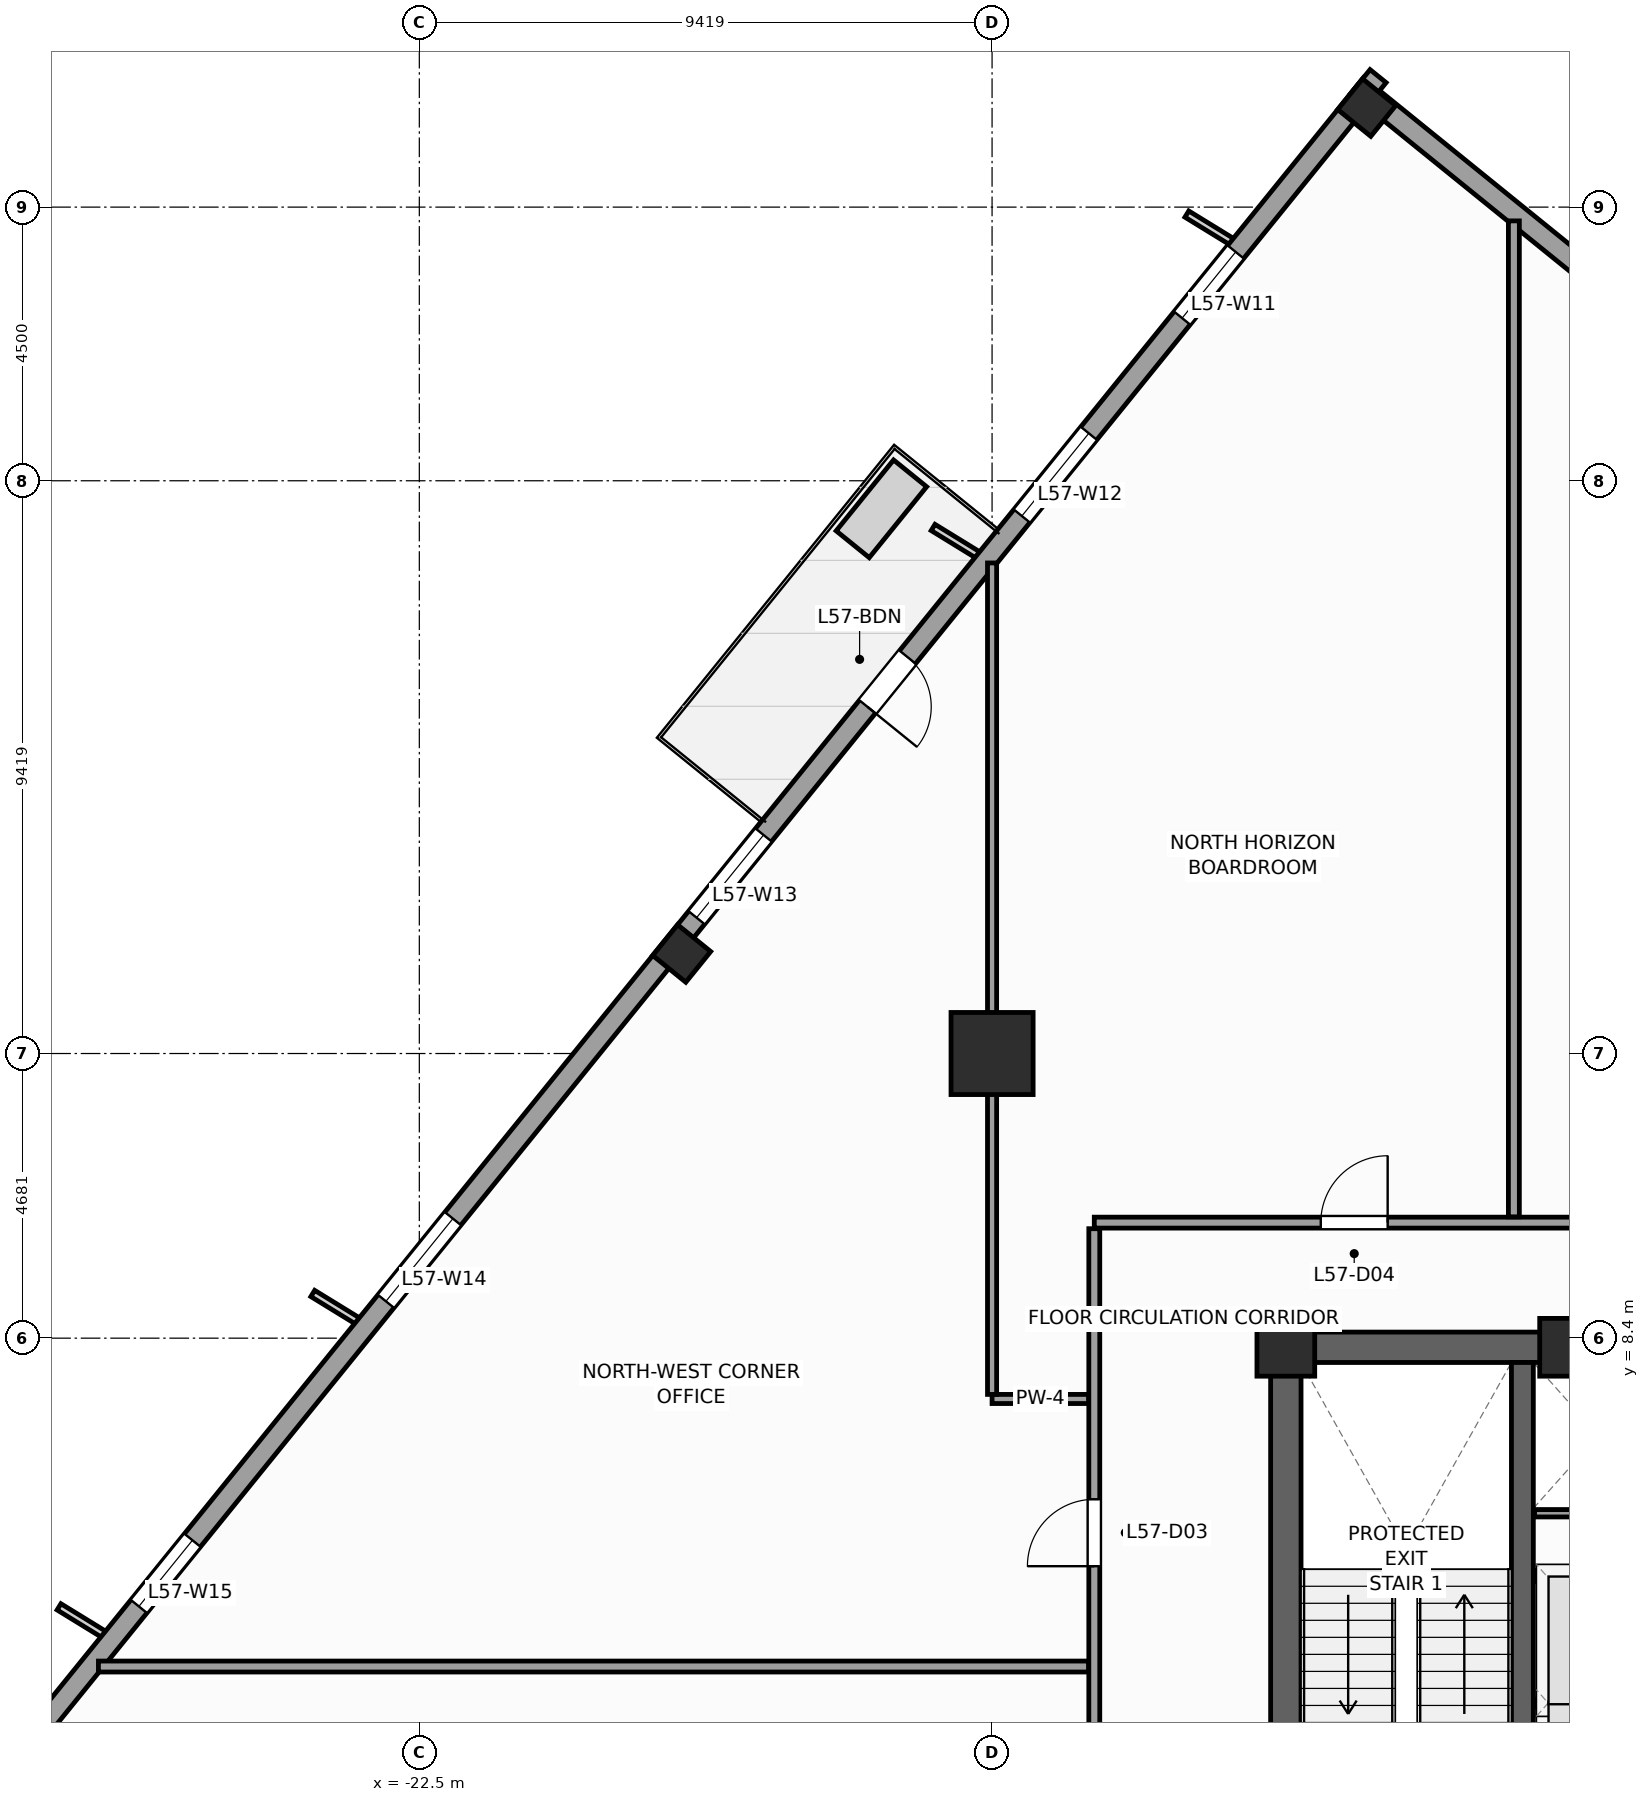
"""IFC4 building model, lengths in metres.
Left out: names, types, materials, properties, quantities, classifications, styles, units other than length and angle.
Written with IfcOpenShell. Run it as: python <this file> out.ifc"""

import sys

from ifc_helpers import new_model, si_unit, direction, frame, frame_2d, origin, origin_2d, place, context, subcontext, project, spatial, rectangle, extrude, source, transform, mapped, element, fill, save


model = new_model("IFC4")
c1 = context("Model", 3, precision=1e-05, world=origin(), true_north=direction((0.0, 1.0)))
c2 = subcontext(c1, "Body", "Model", "MODEL_VIEW")
j1 = project(units=[si_unit("LENGTHUNIT", "METRE"), si_unit("PLANEANGLEUNIT", "RADIAN")], contexts=[c1])
p1 = place(None, origin())
s1 = spatial("IfcSite", under=j1, at=p1, CompositionType="ELEMENT")
p2 = place(p1, origin())
s2 = spatial("IfcBuilding", under=s1, at=p2, CompositionType="ELEMENT")
p3 = place(p2, frame((0.0, 0.0, 236.8)))
s3 = spatial("IfcBuildingStorey", under=s2, at=p3, CompositionType="ELEMENT", Elevation=236.8)
p4 = place(p3, frame((-8.5, 8.25, 0.0), z_axis=(0.0, 0.0, 1.0), x_axis=(1.0, 0.0, 0.0)))
e1 = element("IfcWall", 1, at=p4, inside=s3, PredefinedType="SHEAR", context=c2, shape_type="SweptSolid", body=[
    extrude(rectangle(XDim=17.0, YDim=0.5, at=frame_2d((8.5, 0.0))), origin(), (0.0, 0.0, 1.0), 3.9),
])
p5 = place(p3, frame((-8.25, -8.0, 0.0), z_axis=(0.0, 0.0, 1.0), x_axis=(0.0, 1.0, 0.0)))
e2 = element("IfcWall", 2, at=p5, inside=s3, PredefinedType="SHEAR", context=c2, shape_type="SweptSolid", body=[
    extrude(rectangle(XDim=16.0, YDim=0.5, at=frame_2d((8.0, 0.0))), origin(), (0.0, 0.0, 1.0), 3.9),
])
p6 = place(p5, frame((4.69, 0.0, 0.0)))
e3 = element("IfcOpeningElement", 3, at=p6, cuts=e2, PredefinedType="OPENING", context=c2, shape_type="SweptSolid", body=[
    extrude(rectangle(XDim=1.3, YDim=2.2, at=frame_2d((0.65, 1.1))), frame((0.0, 0.26, 0.0), z_axis=(0.0, -1.0, 0.0), x_axis=(1.0, 0.0, 0.0)), (0.0, 0.0, 1.0), 0.52),
])
p7 = place(p3, frame((-4.36, -8.0, 0.0), z_axis=(0.0, 0.0, 1.0), x_axis=(0.0, 1.0, 0.0)))
e4 = element("IfcWall", 4, at=p7, inside=s3, PredefinedType="SHEAR", context=c2, shape_type="SweptSolid", body=[
    extrude(rectangle(XDim=16.0, YDim=0.36, at=frame_2d((8.0, 0.0))), origin(), (0.0, 0.0, 1.0), 3.9),
])
m1 = source(origin(), c2, "Body", "SweptSolid", [
    extrude(rectangle(XDim=0.95, YDim=0.95, at=origin_2d()), origin(), (0.0, 0.0, 1.0), 3.9),
])
for number, where, z_axis, x_axis in (
    (5, (-8.25, 8.25, 0.0), (0.0, 0.0, 1.0), (1.0, 0.0, 0.0)),
    (6, (-3.6, 8.25, 0.0), (0.0, 0.0, 1.0), (1.0, 0.0, 0.0)),
):
    element("IfcColumn", number, at=place(p3, frame(where, z_axis=z_axis, x_axis=x_axis)), inside=s3, PredefinedType="PILASTER", context=c2, shape_type="MappedRepresentation", body=[
        mapped(m1, transform((0.0, 0.0, 0.0), scale=1.0)),
    ])
m2 = source(origin(), c2, "Body", "SweptSolid", [
    extrude(rectangle(XDim=1.35, YDim=1.35, at=origin_2d()), origin(), (0.0, 0.0, 1.0), 3.9),
])
p8 = place(p3, frame((-13.081, 13.081, 0.0), z_axis=(0.0, 0.0, 1.0), x_axis=(1.0, 0.0, 0.0)))
e7 = element("IfcColumn", 7, at=p8, inside=s3, PredefinedType="COLUMN", context=c2, shape_type="MappedRepresentation", body=[
    mapped(m2, transform((0.0, 0.0, 0.0), scale=1.0)),
])
m3 = source(origin(), c2, "Body", "SweptSolid", [
    extrude(rectangle(XDim=0.65, YDim=0.7, at=origin_2d()), origin(), (0.0, 0.0, 1.0), 3.9),
])
for number, where, z_axis, x_axis in (
    (8, (-6.92, 28.637, 0.0), (0.0, 0.0, 1.0), (0.629, 0.777, 0.0)),
    (9, (-18.185, 14.726, 0.0), (0.0, 0.0, 1.0), (0.629, 0.777, 0.0)),
):
    element("IfcColumn", number, at=place(p3, frame(where, z_axis=z_axis, x_axis=x_axis)), inside=s3, PredefinedType="COLUMN", context=c2, shape_type="MappedRepresentation", body=[
        mapped(m3, transform((0.0, 0.0, 0.0), scale=1.0)),
    ])
p9 = place(p3, frame((-2.673, 25.429, 0.0), z_axis=(0.0, 0.0, 1.0), x_axis=(-0.777162640055, 0.629299794138, 0.0)))
e10 = element("IfcWall", 10, at=p9, inside=s3, PredefinedType="STANDARD", context=c2, shape_type="SweptSolid", body=[
    extrude(rectangle(XDim=5.67, YDim=0.34, at=frame_2d((2.835, 0.0))), origin(), (0.0, 0.0, 1.0), 3.66),
])
p10 = place(p3, frame((-6.733, 29.154, 0.0), z_axis=(0.0, 0.0, 1.0), x_axis=(-0.629325378072, -0.77714192302, 0.0)))
e11 = element("IfcWall", 11, at=p10, inside=s3, PredefinedType="STANDARD", context=c2, shape_type="SweptSolid", body=[
    extrude(rectangle(XDim=36.84, YDim=0.34, at=frame_2d((18.42, 0.0))), origin(), (0.0, 0.0, 1.0), 2.96),
])
p11 = place(p10, frame((12.295, 0.0, 0.0)))
e12 = element("IfcOpeningElement", 12, at=p11, cuts=e11, PredefinedType="OPENING", context=c2, shape_type="SweptSolid", body=[
    extrude(rectangle(XDim=1.05, YDim=2.25, at=frame_2d((0.525, 1.125))), frame((0.0, 0.18, 0.0), z_axis=(0.0, -1.0, 0.0), x_axis=(1.0, 0.0, 0.0)), (0.0, 0.0, 1.0), 0.36),
])
p12 = place(p10, frame((3.721, 0.0, 0.48)))
e13 = element("IfcOpeningElement", 13, at=p12, cuts=e11, PredefinedType="OPENING", context=c2, shape_type="SweptSolid", body=[
    extrude(rectangle(XDim=1.4, YDim=2.4, at=frame_2d((0.7, 1.2))), frame((0.0, 0.18, 0.0), z_axis=(0.0, -1.0, 0.0), x_axis=(1.0, 0.0, 0.0)), (0.0, 0.0, 1.0), 0.36),
])
p13 = place(p10, frame((7.559, 0.0, 0.58)))
e14 = element("IfcOpeningElement", 14, at=p13, cuts=e11, PredefinedType="OPENING", context=c2, shape_type="SweptSolid", body=[
    extrude(rectangle(XDim=1.75, YDim=2.3, at=frame_2d((0.875, 1.15))), frame((0.0, 0.18, 0.0), z_axis=(0.0, -1.0, 0.0), x_axis=(1.0, 0.0, 0.0)), (0.0, 0.0, 1.0), 0.36),
])
p14 = place(p10, frame((16.058, 0.0, 0.58)))
e15 = element("IfcOpeningElement", 15, at=p14, cuts=e11, PredefinedType="OPENING", context=c2, shape_type="SweptSolid", body=[
    extrude(rectangle(XDim=1.75, YDim=2.3, at=frame_2d((0.875, 1.15))), frame((0.0, 0.18, 0.0), z_axis=(0.0, -1.0, 0.0), x_axis=(1.0, 0.0, 0.0)), (0.0, 0.0, 1.0), 0.36),
])
p15 = place(p10, frame((24.176, 0.0, 0.58)))
e16 = element("IfcOpeningElement", 16, at=p15, cuts=e11, PredefinedType="OPENING", context=c2, shape_type="SweptSolid", body=[
    extrude(rectangle(XDim=1.75, YDim=2.3, at=frame_2d((0.875, 1.15))), frame((0.0, 0.18, 0.0), z_axis=(0.0, -1.0, 0.0), x_axis=(1.0, 0.0, 0.0)), (0.0, 0.0, 1.0), 0.36),
])
p16 = place(p10, frame((30.982, 0.0, 0.48)))
e17 = element("IfcOpeningElement", 17, at=p16, cuts=e11, PredefinedType="OPENING", context=c2, shape_type="SweptSolid", body=[
    extrude(rectangle(XDim=1.4, YDim=2.4, at=frame_2d((0.7, 1.2))), frame((0.0, 0.18, 0.0), z_axis=(0.0, -1.0, 0.0), x_axis=(1.0, 0.0, 0.0)), (0.0, 0.0, 1.0), 0.36),
])
p17 = place(p3, frame((-4.17, 4.49, 0.0), z_axis=(0.0, 0.0, 1.0), x_axis=(1.0, 0.0, 0.0)))
e18 = element("IfcWall", 18, at=p17, inside=s3, PredefinedType="PARTITIONING", context=c2, shape_type="SweptSolid", body=[
    extrude(rectangle(XDim=2.28, YDim=0.18, at=frame_2d((1.14, 0.0))), origin(), (0.0, 0.0, 1.0), 3.66),
])
p18 = place(p3, frame((-4.16, 2.4, 0.0), z_axis=(0.0, 0.0, 1.0), x_axis=(1.0, 0.0, 0.0)))
e19 = element("IfcWall", 19, at=p18, inside=s3, PredefinedType="PARTITIONING", context=c2, shape_type="SweptSolid", body=[
    extrude(rectangle(XDim=2.26, YDim=0.12, at=frame_2d((1.13, 0.0))), origin(), (0.0, 0.0, 1.0), 3.66),
])
p19 = place(p3, frame((-4.16, 5.52, 0.0), z_axis=(0.0, 0.0, 1.0), x_axis=(1.0, 0.0, 0.0)))
e20 = element("IfcWall", 20, at=p19, inside=s3, PredefinedType="PARTITIONING", context=c2, shape_type="SweptSolid", body=[
    extrude(rectangle(XDim=2.1, YDim=0.12, at=frame_2d((1.05, 0.0))), origin(), (0.0, 0.0, 1.0), 3.66),
])
p20 = place(p3, frame((-11.4, 10.3, 0.0), z_axis=(0.0, 0.0, 1.0), x_axis=(1.0, 0.0, 0.0)))
e21 = element("IfcWall", 21, at=p20, inside=s3, PredefinedType="PARTITIONING", context=c2, shape_type="SweptSolid", body=[
    extrude(rectangle(XDim=21.7, YDim=0.18, at=frame_2d((10.85, 0.0))), origin(), (0.0, 0.0, 1.0), 3.66),
])
p21 = place(p20, frame((10.925, 0.0, 0.0)))
e22 = element("IfcOpeningElement", 22, at=p21, cuts=e21, PredefinedType="OPENING", context=c2, shape_type="SweptSolid", body=[
    extrude(rectangle(XDim=0.95, YDim=2.1, at=frame_2d((0.475, 1.05))), frame((0.0, 0.1, 0.0), z_axis=(0.0, -1.0, 0.0), x_axis=(1.0, 0.0, 0.0)), (0.0, 0.0, 1.0), 0.2),
])
p22 = place(p20, frame((3.724, 0.0, 0.0)))
e23 = element("IfcOpeningElement", 23, at=p22, cuts=e21, PredefinedType="OPENING", context=c2, shape_type="SweptSolid", body=[
    extrude(rectangle(XDim=1.1, YDim=2.2, at=frame_2d((0.55, 1.1))), frame((0.0, 0.1, 0.0), z_axis=(0.0, -1.0, 0.0), x_axis=(1.0, 0.0, 0.0)), (0.0, 0.0, 1.0), 0.2),
])
p23 = place(p20, frame((8.326, 0.0, 0.0)))
e24 = element("IfcOpeningElement", 24, at=p23, cuts=e21, PredefinedType="OPENING", context=c2, shape_type="SweptSolid", body=[
    extrude(rectangle(XDim=1.1, YDim=2.2, at=frame_2d((0.55, 1.1))), frame((0.0, 0.1, 0.0), z_axis=(0.0, -1.0, 0.0), x_axis=(1.0, 0.0, 0.0)), (0.0, 0.0, 1.0), 0.2),
])
p24 = place(p20, frame((18.085, 0.0, 0.0)))
e25 = element("IfcOpeningElement", 25, at=p24, cuts=e21, PredefinedType="OPENING", context=c2, shape_type="SweptSolid", body=[
    extrude(rectangle(XDim=1.1, YDim=2.2, at=frame_2d((0.55, 1.1))), frame((0.0, 0.1, 0.0), z_axis=(0.0, -1.0, 0.0), x_axis=(1.0, 0.0, 0.0)), (0.0, 0.0, 1.0), 0.2),
])
p25 = place(p3, frame((-11.4, -10.2, 0.0), z_axis=(0.0, 0.0, 1.0), x_axis=(0.0, 1.0, 0.0)))
e26 = element("IfcWall", 26, at=p25, inside=s3, PredefinedType="PARTITIONING", context=c2, shape_type="SweptSolid", body=[
    extrude(rectangle(XDim=20.4, YDim=0.18, at=frame_2d((10.2, 0.0))), origin(), (0.0, 0.0, 1.0), 3.66),
])
p26 = place(p25, frame((14.85, 0.0, 0.0)))
e27 = element("IfcOpeningElement", 27, at=p26, cuts=e26, PredefinedType="OPENING", context=c2, shape_type="SweptSolid", body=[
    extrude(rectangle(XDim=1.1, YDim=2.2, at=frame_2d((0.55, 1.1))), frame((0.0, 0.1, 0.0), z_axis=(0.0, -1.0, 0.0), x_axis=(1.0, 0.0, 0.0)), (0.0, 0.0, 1.0), 0.2),
])
p27 = place(p25, frame((4.7, 0.0, 0.0)))
e28 = element("IfcOpeningElement", 28, at=p27, cuts=e26, PredefinedType="OPENING", context=c2, shape_type="SweptSolid", body=[
    extrude(rectangle(XDim=1.1, YDim=2.2, at=frame_2d((0.55, 1.1))), frame((0.0, 0.1, 0.0), z_axis=(0.0, -1.0, 0.0), x_axis=(1.0, 0.0, 0.0)), (0.0, 0.0, 1.0), 0.2),
])
p28 = place(p25, frame((9.9, 0.0, 0.0)))
e29 = element("IfcOpeningElement", 29, at=p28, cuts=e26, PredefinedType="OPENING", context=c2, shape_type="SweptSolid", body=[
    extrude(rectangle(XDim=1.1, YDim=2.2, at=frame_2d((0.55, 1.1))), frame((0.0, 0.1, 0.0), z_axis=(0.0, -1.0, 0.0), x_axis=(1.0, 0.0, 0.0)), (0.0, 0.0, 1.0), 0.2),
])
p29 = place(p3, frame((-4.5, 10.395, 0.0), z_axis=(0.0, 0.0, 1.0), x_axis=(0.0, 1.0, 0.0)))
e30 = element("IfcWall", 30, at=p29, inside=s3, PredefinedType="PARTITIONING", context=c2, shape_type="SweptSolid", body=[
    extrude(rectangle(XDim=16.378, YDim=0.18, at=frame_2d((8.189, 0.0))), origin(), (0.0, 0.0, 1.0), 3.66),
])
p30 = place(p3, frame((-11.495, 3.0, 0.0), z_axis=(0.0, 0.0, 1.0), x_axis=(-1.0, 0.0, 0.0)))
e31 = element("IfcWall", 31, at=p30, inside=s3, PredefinedType="PARTITIONING", context=c2, shape_type="SweptSolid", body=[
    extrude(rectangle(XDim=16.282, YDim=0.18, at=frame_2d((8.141, 0.0))), origin(), (0.0, 0.0, 1.0), 3.66),
])
p31 = place(p3, frame((-11.495, 7.4, 0.0), z_axis=(0.0, 0.0, 1.0), x_axis=(-1.0, 0.0, 0.0)))
e32 = element("IfcWall", 32, at=p31, inside=s3, PredefinedType="PARTITIONING", context=c2, shape_type="SweptSolid", body=[
    extrude(rectangle(XDim=1.586, YDim=0.15, at=frame_2d((0.793, 0.0))), origin(), (0.0, 0.0, 1.0), 3.66),
])
p32 = place(p3, frame((-13.081, 7.475, 0.0), z_axis=(0.0, 0.0, 1.0), x_axis=(0.0, 1.0, 0.0)))
e33 = element("IfcWall", 33, at=p32, inside=s3, PredefinedType="PARTITIONING", context=c2, shape_type="SweptSolid", body=[
    extrude(rectangle(XDim=13.673, YDim=0.15, at=frame_2d((6.837, 0.0))), origin(), (0.0, 0.0, 1.0), 2.76),
])
m4 = source(origin(), c2, "Body", "SweptSolid", [
    extrude(rectangle(XDim=1.05, YDim=2.25, at=frame_2d((0.525, 1.125))), frame((0.0, 0.025, 0.0), z_axis=(0.0, -1.0, 0.0), x_axis=(1.0, 0.0, 0.0)), (0.0, 0.0, 1.0), 0.05),
])
p33 = place(p11, origin())
e34 = element("IfcDoor", 34, at=p33, inside=s3, OperationType="SINGLE_SWING_RIGHT", PredefinedType="DOOR", context=c2, shape_type="MappedRepresentation", body=[
    mapped(m4, transform((0.0, 0.0, 0.0), scale=1.0)),
])
fill(e12, e34)
m5 = source(origin(), c2, "Body", "SweptSolid", [
    extrude(rectangle(XDim=1.4, YDim=2.4, at=frame_2d((0.7, 1.2))), frame((0.0, 0.03, 0.0), z_axis=(0.0, -1.0, 0.0), x_axis=(1.0, 0.0, 0.0)), (0.0, 0.0, 1.0), 0.06),
])
p34 = place(p12, origin())
e35 = element("IfcWindow", 35, at=p34, inside=s3, PartitioningType="SINGLE_PANEL", PredefinedType="WINDOW", context=c2, shape_type="MappedRepresentation", body=[
    mapped(m5, transform((0.0, 0.0, 0.0), scale=1.0)),
])
fill(e13, e35)
m6 = source(origin(), c2, "Body", "SweptSolid", [
    extrude(rectangle(XDim=1.75, YDim=2.3, at=frame_2d((0.875, 1.15))), frame((0.0, 0.03, 0.0), z_axis=(0.0, -1.0, 0.0), x_axis=(1.0, 0.0, 0.0)), (0.0, 0.0, 1.0), 0.06),
])
p35 = place(p13, origin())
e36 = element("IfcWindow", 36, at=p35, inside=s3, PartitioningType="SINGLE_PANEL", PredefinedType="WINDOW", context=c2, shape_type="MappedRepresentation", body=[
    mapped(m6, transform((0.0, 0.0, 0.0), scale=1.0)),
])
fill(e14, e36)
p36 = place(p14, origin())
e37 = element("IfcWindow", 37, at=p36, inside=s3, PartitioningType="SINGLE_PANEL", PredefinedType="WINDOW", context=c2, shape_type="MappedRepresentation", body=[
    mapped(m6, transform((0.0, 0.0, 0.0), scale=1.0)),
])
fill(e15, e37)
p37 = place(p15, origin())
e38 = element("IfcWindow", 38, at=p37, inside=s3, PartitioningType="SINGLE_PANEL", PredefinedType="WINDOW", context=c2, shape_type="MappedRepresentation", body=[
    mapped(m6, transform((0.0, 0.0, 0.0), scale=1.0)),
])
fill(e16, e38)
p38 = place(p16, origin())
e39 = element("IfcWindow", 39, at=p38, inside=s3, PartitioningType="SINGLE_PANEL", PredefinedType="WINDOW", context=c2, shape_type="MappedRepresentation", body=[
    mapped(m5, transform((0.0, 0.0, 0.0), scale=1.0)),
])
fill(e17, e39)
m7 = source(origin(), c2, "Body", "SweptSolid", [
    extrude(rectangle(XDim=1.1, YDim=2.2, at=frame_2d((0.55, 1.1))), frame((0.0, 0.025, 0.0), z_axis=(0.0, -1.0, 0.0), x_axis=(1.0, 0.0, 0.0)), (0.0, 0.0, 1.0), 0.05),
])
p39 = place(p26, origin())
e40 = element("IfcDoor", 40, at=p39, inside=s3, OperationType="SINGLE_SWING_LEFT", PredefinedType="DOOR", context=c2, shape_type="MappedRepresentation", body=[
    mapped(m7, transform((0.0, 0.0, 0.0), scale=1.0)),
])
fill(e27, e40)
p40 = place(p22, origin())
e41 = element("IfcDoor", 41, at=p40, inside=s3, OperationType="SINGLE_SWING_RIGHT", PredefinedType="DOOR", context=c2, shape_type="MappedRepresentation", body=[
    mapped(m7, transform((0.0, 0.0, 0.0), scale=1.0)),
])
fill(e23, e41)
save(model, sys.argv[1])
